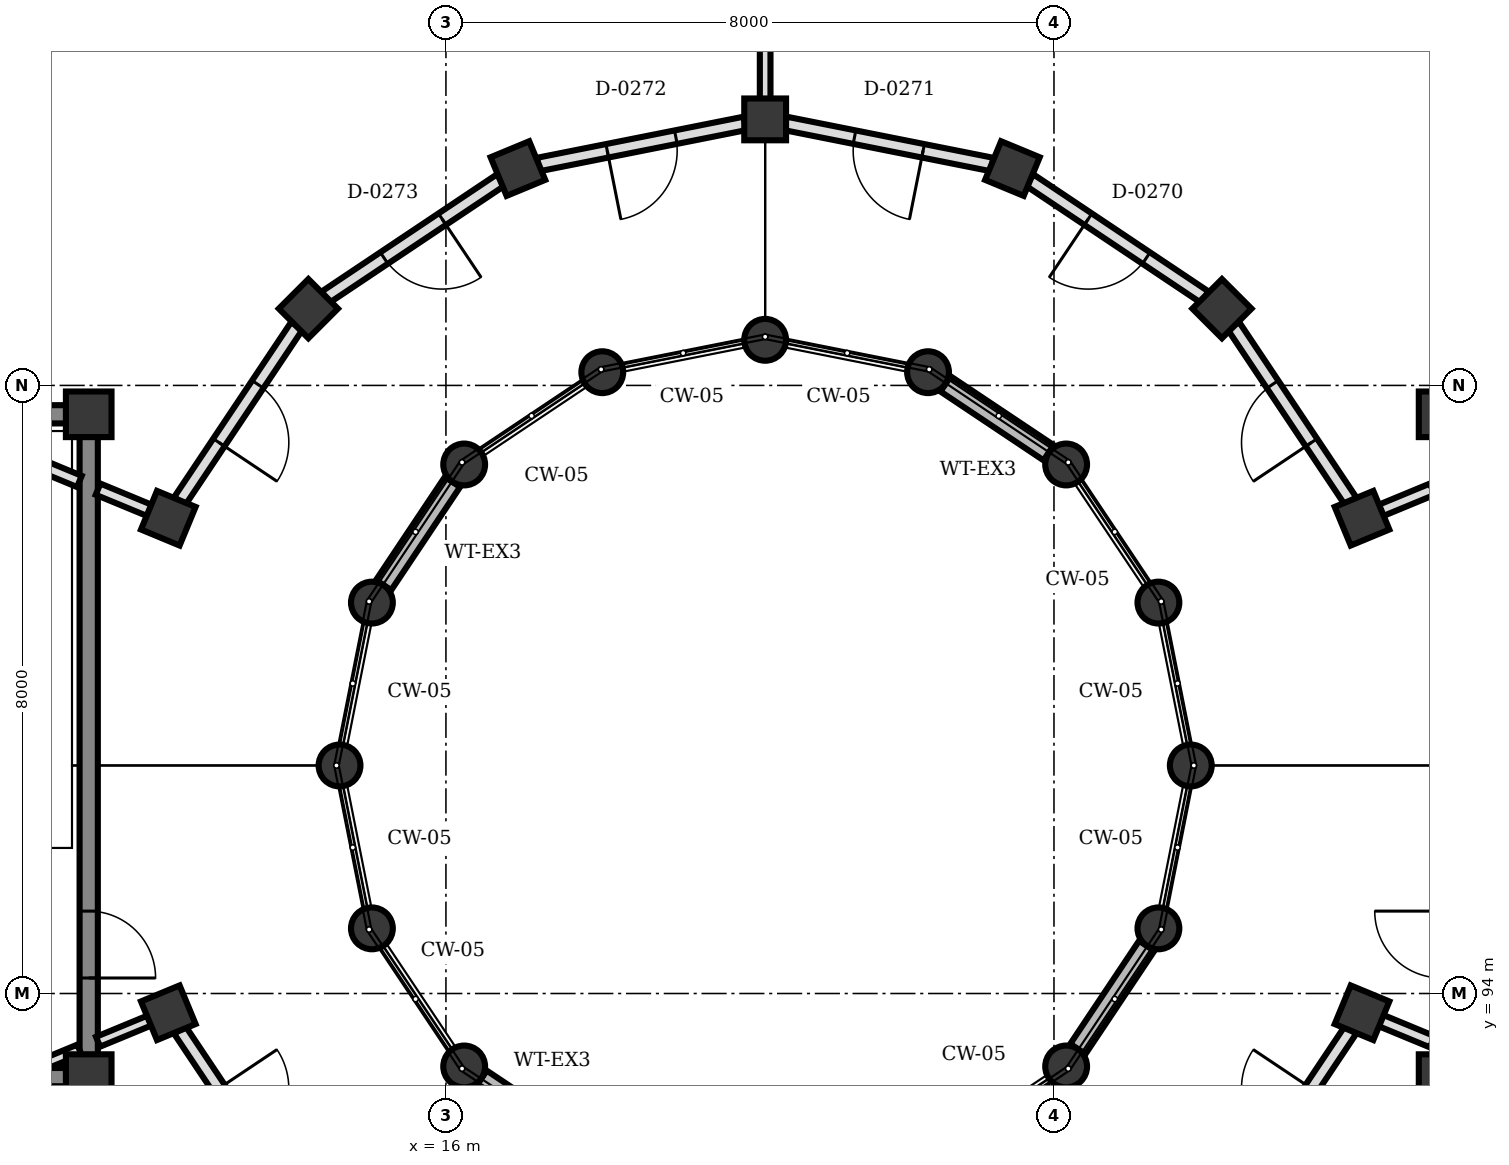
"""IFC4 building model, lengths in metres.
Left out: names, types, materials, properties, quantities, classifications, styles, units other than length and angle.
Written with IfcOpenShell. Run it as: python <this file> out.ifc"""

import sys

from ifc_helpers import new_model, si_unit, direction, frame, frame_2d, origin, origin_2d, place, context, subcontext, project, spatial, rectangle, circle, extrude, element, fill, save


model = new_model("IFC4")
c1 = context("Model", 3, precision=1e-05, world=origin(), true_north=direction((0.0, 1.0)))
c2 = subcontext(c1, "Body", "Model", "MODEL_VIEW")
j1 = project(units=[si_unit("LENGTHUNIT", "METRE"), si_unit("PLANEANGLEUNIT", "RADIAN")], contexts=[c1])
p1 = place(None, origin())
s1 = spatial("IfcSite", under=j1, at=p1, CompositionType="ELEMENT")
p2 = place(p1, origin())
s2 = spatial("IfcBuilding", under=s1, at=p2, CompositionType="ELEMENT")
p3 = place(p2, frame((0.0, 0.0, 12.5)))
s3 = spatial("IfcBuildingStorey", under=s2, at=p3, CompositionType="ELEMENT", Elevation=12.5)
for number, where, z_axis, x_axis in (
    (1, (11.3, 92.9, 0.0), (0.0, 0.0, 1.0), (1.0, 0.0, 0.0)),
    (2, (11.3, 101.62, 0.0), (0.0, 0.0, 1.0), (1.0, 0.0, 0.0)),
    (3, (29.1, 92.9, 0.0), (0.0, 0.0, 1.0), (1.0, 0.0, 0.0)),
    (4, (29.1, 101.62, 0.0), (0.0, 0.0, 1.0), (1.0, 0.0, 0.0)),
):
    element("IfcColumn", number, at=place(p3, frame(where, z_axis=z_axis, x_axis=x_axis)), inside=s3, PredefinedType="COLUMN", context=c2, shape_type="SweptSolid", body=[
        extrude(rectangle(XDim=0.6, YDim=0.6, at=origin_2d()), origin(), (0.0, 0.0, 1.0), 4.0),
    ])
for number, where, z_axis, x_axis in (
    (5, (25.8, 97.0, 0.0), (0.0, 0.0, 1.0), (1.0, 0.0, 0.0)),
    (6, (25.374, 99.143, 0.0), (0.0, 0.0, 1.0), (1.0, 0.0, 0.0)),
    (7, (24.16, 100.96, 0.0), (0.0, 0.0, 1.0), (1.0, 0.0, 0.0)),
    (8, (22.343, 102.174, 0.0), (0.0, 0.0, 1.0), (1.0, 0.0, 0.0)),
    (9, (20.2, 102.6, 0.0), (0.0, 0.0, 1.0), (1.0, 0.0, 0.0)),
    (10, (18.057, 102.174, 0.0), (0.0, 0.0, 1.0), (1.0, 0.0, 0.0)),
    (11, (16.24, 100.96, 0.0), (0.0, 0.0, 1.0), (1.0, 0.0, 0.0)),
    (12, (15.026, 99.143, 0.0), (0.0, 0.0, 1.0), (1.0, 0.0, 0.0)),
    (13, (14.6, 97.0, 0.0), (0.0, 0.0, 1.0), (1.0, 0.0, 0.0)),
    (14, (15.026, 94.857, 0.0), (0.0, 0.0, 1.0), (1.0, 0.0, 0.0)),
    (15, (16.24, 93.04, 0.0), (0.0, 0.0, 1.0), (1.0, 0.0, 0.0)),
    (16, (24.16, 93.04, 0.0), (0.0, 0.0, 1.0), (1.0, 0.0, 0.0)),
    (17, (25.374, 94.857, 0.0), (0.0, 0.0, 1.0), (1.0, 0.0, 0.0)),
):
    element("IfcColumn", number, at=place(p3, frame(where, z_axis=z_axis, x_axis=x_axis)), inside=s3, PredefinedType="COLUMN", context=c2, shape_type="SweptSolid", body=[
        extrude(circle(Radius=0.275, at=origin_2d()), origin(), (0.0, 0.0, 1.0), 3.765),
    ])
for number, where, z_axis, x_axis in (
    (18, (28.053, 100.253, 0.0), (0.0, 0.0, 1.0), (0.924, 0.383, 0.0)),
    (19, (26.21, 103.01, 0.0), (0.0, 0.0, 1.0), (0.707, 0.707, 0.0)),
    (20, (23.453, 104.853, 0.0), (0.0, 0.0, 1.0), (0.383, 0.924, 0.0)),
    (21, (20.2, 105.5, 0.0), (0.0, 0.0, 1.0), (0.0, 1.0, 0.0)),
    (22, (16.947, 104.853, 0.0), (0.0, 0.0, 1.0), (-0.383, 0.924, 0.0)),
    (23, (14.19, 103.01, 0.0), (0.0, 0.0, 1.0), (-0.707, 0.707, 0.0)),
    (24, (12.347, 100.253, 0.0), (0.0, 0.0, 1.0), (-0.924, 0.383, 0.0)),
    (25, (12.347, 93.747, 0.0), (0.0, 0.0, 1.0), (-0.924, -0.383, 0.0)),
    (26, (28.053, 93.747, 0.0), (0.0, 0.0, 1.0), (0.924, -0.383, 0.0)),
):
    element("IfcColumn", number, at=place(p3, frame(where, z_axis=z_axis, x_axis=x_axis)), inside=s3, PredefinedType="COLUMN", context=c2, shape_type="SweptSolid", body=[
        extrude(rectangle(XDim=0.55, YDim=0.55, at=origin_2d()), origin(), (0.0, 0.0, 1.0), 4.49),
    ])
for number, where, z_axis, x_axis in (
    (27, (23.93, 101.114, 0.0), (0.0, 0.0, 1.0), (-0.832, 0.555, 0.0)),
    (28, (16.086, 100.73, 0.0), (0.0, 0.0, 1.0), (-0.555, -0.832, 0.0)),
    (29, (16.47, 92.886, 0.0), (0.0, 0.0, 1.0), (0.832, -0.555, 0.0)),
    (30, (24.314, 93.27, 0.0), (0.0, 0.0, 1.0), (0.555, 0.832, 0.0)),
):
    element("IfcWall", number, at=place(p3, frame(where, z_axis=z_axis, x_axis=x_axis)), inside=s3, PredefinedType="SOLIDWALL", context=c2, shape_type="SweptSolid", body=[
        extrude(rectangle(XDim=1.632, YDim=0.24, at=frame_2d((0.816, 0.0))), origin(), (0.0, 0.0, 1.0), 3.275),
    ])
p4 = place(p3, frame((11.3, 101.328, 0.0), z_axis=(0.0, 0.0, 1.0), x_axis=(0.0, -1.0, 0.0)))
e31 = element("IfcWall", 31, at=p4, inside=s3, PredefinedType="SHEAR", context=c2, shape_type="SweptSolid", body=[
    extrude(rectangle(XDim=8.136, YDim=0.24, at=frame_2d((4.068, 0.0))), origin(), (0.0, 0.0, 1.0), 3.74),
])
p5 = place(p4, frame((6.244, 0.0, 0.0)))
e32 = element("IfcOpeningElement", 32, at=p5, cuts=e31, PredefinedType="OPENING", context=c2, shape_type="SweptSolid", body=[
    extrude(rectangle(XDim=0.88, YDim=2.1, at=frame_2d((0.44, 1.05))), frame((0.0, 0.13, 0.0), z_axis=(0.0, -1.0, 0.0), x_axis=(1.0, 0.0, 0.0)), (0.0, 0.0, 1.0), 0.26),
])
for number, where, z_axis, x_axis in (
    (33, (11.008, 92.9, 0.0), (0.0, 0.0, 1.0), (-1.0, 0.0, 0.0)),
    (34, (11.008, 101.62, 0.0), (0.0, 0.0, 1.0), (-1.0, 0.0, 0.0)),
):
    element("IfcWall", number, at=place(p3, frame(where, z_axis=z_axis, x_axis=x_axis)), inside=s3, PredefinedType="SHEAR", context=c2, shape_type="SweptSolid", body=[
        extrude(rectangle(XDim=4.216, YDim=0.24, at=frame_2d((2.108, 0.0))), origin(), (0.0, 0.0, 1.0), 3.74),
    ])
p6 = place(p3, frame((28.3, 100.355, 0.0), z_axis=(0.0, 0.0, 1.0), x_axis=(0.924069600435, 0.382224245113, 0.0)))
e35 = element("IfcWall", 35, at=p6, inside=s3, PredefinedType="PARTITIONING", context=c2, shape_type="SweptSolid", body=[
    extrude(rectangle(XDim=0.733, YDim=0.16, at=frame_2d((0.366, 0.0))), origin(), (0.0, 0.0, 1.0), 3.7),
])
p7 = place(p3, frame((20.2, 105.767, 0.0), z_axis=(0.0, 0.0, 1.0), x_axis=(0.0, 1.0, 0.0)))
e36 = element("IfcWall", 36, at=p7, inside=s3, PredefinedType="PARTITIONING", context=c2, shape_type="SweptSolid", body=[
    extrude(rectangle(XDim=8.441, YDim=0.14, at=frame_2d((4.22, 0.0))), origin(), (0.0, 0.0, 1.0), 3.7),
])
p8 = place(p3, frame((12.1, 100.355, 0.0), z_axis=(0.0, 0.0, 1.0), x_axis=(-0.924069600435, 0.382224245113, 0.0)))
e37 = element("IfcWall", 37, at=p8, inside=s3, PredefinedType="PARTITIONING", context=c2, shape_type="SweptSolid", body=[
    extrude(rectangle(XDim=0.733, YDim=0.16, at=frame_2d((0.366, 0.0))), origin(), (0.0, 0.0, 1.0), 3.7),
])
p9 = place(p3, frame((11.177, 100.737, 0.0), z_axis=(0.0, 0.0, 1.0), x_axis=(-0.923817443679, 0.382833293686, 0.0)))
e38 = element("IfcWall", 38, at=p9, inside=s3, PredefinedType="PARTITIONING", context=c2, shape_type="SweptSolid", body=[
    extrude(rectangle(XDim=1.985, YDim=0.16, at=frame_2d((0.993, 0.0))), origin(), (0.0, 0.0, 1.0), 3.7),
])
p10 = place(p3, frame((12.1, 93.645, 0.0), z_axis=(0.0, 0.0, 1.0), x_axis=(-0.924069600435, -0.382224245113, 0.0)))
e39 = element("IfcWall", 39, at=p10, inside=s3, PredefinedType="PARTITIONING", context=c2, shape_type="SweptSolid", body=[
    extrude(rectangle(XDim=0.733, YDim=0.14, at=frame_2d((0.366, 0.0))), origin(), (0.0, 0.0, 1.0), 3.7),
])
p11 = place(p3, frame((11.177, 93.263, 0.0), z_axis=(0.0, 0.0, 1.0), x_axis=(-0.923812676193, -0.382844797933, 0.0)))
e40 = element("IfcWall", 40, at=p11, inside=s3, PredefinedType="PARTITIONING", context=c2, shape_type="SweptSolid", body=[
    extrude(rectangle(XDim=0.627, YDim=0.14, at=frame_2d((0.313, 0.0))), origin(), (0.0, 0.0, 1.0), 3.7),
])
p12 = place(p3, frame((28.3, 93.645, 0.0), z_axis=(0.0, 0.0, 1.0), x_axis=(0.924069600435, -0.382224245113, 0.0)))
e41 = element("IfcWall", 41, at=p12, inside=s3, PredefinedType="PARTITIONING", context=c2, shape_type="SweptSolid", body=[
    extrude(rectangle(XDim=0.733, YDim=0.16, at=frame_2d((0.366, 0.0))), origin(), (0.0, 0.0, 1.0), 3.7),
])
p13 = place(p3, frame((27.902, 100.479, 0.0), z_axis=(0.0, 0.0, 1.0), x_axis=(-0.555797002478, 0.831318045056, 0.0)))
e42 = element("IfcWall", 42, at=p13, inside=s3, PredefinedType="PARTITIONING", context=c2, shape_type="SweptSolid", body=[
    extrude(rectangle(XDim=2.773, YDim=0.18, at=frame_2d((1.386, 0.0))), origin(), (0.0, 0.0, 1.0), 3.7),
])
p14 = place(p13, frame((0.926, 0.0, 0.0)))
e43 = element("IfcOpeningElement", 43, at=p14, cuts=e42, PredefinedType="OPENING", context=c2, shape_type="SweptSolid", body=[
    extrude(rectangle(XDim=0.92, YDim=2.1, at=frame_2d((0.46, 1.05))), frame((0.0, 0.1, 0.0), z_axis=(0.0, -1.0, 0.0), x_axis=(1.0, 0.0, 0.0)), (0.0, 0.0, 1.0), 0.2),
])
p15 = place(p3, frame((25.984, 103.161, 0.0), z_axis=(0.0, 0.0, 1.0), x_axis=(-0.831318045056, 0.555797002478, 0.0)))
e44 = element("IfcWall", 44, at=p15, inside=s3, PredefinedType="PARTITIONING", context=c2, shape_type="SweptSolid", body=[
    extrude(rectangle(XDim=2.773, YDim=0.18, at=frame_2d((1.386, 0.0))), origin(), (0.0, 0.0, 1.0), 3.7),
])
p16 = place(p15, frame((0.926, 0.0, 0.0)))
e45 = element("IfcOpeningElement", 45, at=p16, cuts=e44, PredefinedType="OPENING", context=c2, shape_type="SweptSolid", body=[
    extrude(rectangle(XDim=0.92, YDim=2.1, at=frame_2d((0.46, 1.05))), frame((0.0, 0.1, 0.0), z_axis=(0.0, -1.0, 0.0), x_axis=(1.0, 0.0, 0.0)), (0.0, 0.0, 1.0), 0.2),
])
p17 = place(p3, frame((23.186, 104.906, 0.0), z_axis=(0.0, 0.0, 1.0), x_axis=(-0.980773264811, 0.195150718759, 0.0)))
e46 = element("IfcWall", 46, at=p17, inside=s3, PredefinedType="PARTITIONING", context=c2, shape_type="SweptSolid", body=[
    extrude(rectangle(XDim=2.772, YDim=0.18, at=frame_2d((1.386, 0.0))), origin(), (0.0, 0.0, 1.0), 3.7),
])
p18 = place(p17, frame((0.926, 0.0, 0.0)))
e47 = element("IfcOpeningElement", 47, at=p18, cuts=e46, PredefinedType="OPENING", context=c2, shape_type="SweptSolid", body=[
    extrude(rectangle(XDim=0.92, YDim=2.1, at=frame_2d((0.46, 1.05))), frame((0.0, 0.1, 0.0), z_axis=(0.0, -1.0, 0.0), x_axis=(1.0, 0.0, 0.0)), (0.0, 0.0, 1.0), 0.2),
])
p19 = place(p3, frame((19.933, 105.447, 0.0), z_axis=(0.0, 0.0, 1.0), x_axis=(-0.980773264811, -0.195150718759, 0.0)))
e48 = element("IfcWall", 48, at=p19, inside=s3, PredefinedType="PARTITIONING", context=c2, shape_type="SweptSolid", body=[
    extrude(rectangle(XDim=2.772, YDim=0.18, at=frame_2d((1.386, 0.0))), origin(), (0.0, 0.0, 1.0), 3.7),
])
p20 = place(p19, frame((0.926, 0.0, 0.0)))
e49 = element("IfcOpeningElement", 49, at=p20, cuts=e48, PredefinedType="OPENING", context=c2, shape_type="SweptSolid", body=[
    extrude(rectangle(XDim=0.92, YDim=2.1, at=frame_2d((0.46, 1.05))), frame((0.0, 0.1, 0.0), z_axis=(0.0, -1.0, 0.0), x_axis=(1.0, 0.0, 0.0)), (0.0, 0.0, 1.0), 0.2),
])
p21 = place(p3, frame((16.721, 104.702, 0.0), z_axis=(0.0, 0.0, 1.0), x_axis=(-0.831318045056, -0.555797002478, 0.0)))
e50 = element("IfcWall", 50, at=p21, inside=s3, PredefinedType="PARTITIONING", context=c2, shape_type="SweptSolid", body=[
    extrude(rectangle(XDim=2.773, YDim=0.18, at=frame_2d((1.386, 0.0))), origin(), (0.0, 0.0, 1.0), 3.7),
])
p22 = place(p21, frame((0.926, 0.0, 0.0)))
e51 = element("IfcOpeningElement", 51, at=p22, cuts=e50, PredefinedType="OPENING", context=c2, shape_type="SweptSolid", body=[
    extrude(rectangle(XDim=0.92, YDim=2.1, at=frame_2d((0.46, 1.05))), frame((0.0, 0.1, 0.0), z_axis=(0.0, -1.0, 0.0), x_axis=(1.0, 0.0, 0.0)), (0.0, 0.0, 1.0), 0.2),
])
p23 = place(p3, frame((14.039, 102.784, 0.0), z_axis=(0.0, 0.0, 1.0), x_axis=(-0.555797002478, -0.831318045056, 0.0)))
e52 = element("IfcWall", 52, at=p23, inside=s3, PredefinedType="PARTITIONING", context=c2, shape_type="SweptSolid", body=[
    extrude(rectangle(XDim=2.773, YDim=0.18, at=frame_2d((1.386, 0.0))), origin(), (0.0, 0.0, 1.0), 3.7),
])
p24 = place(p23, frame((0.926, 0.0, 0.0)))
e53 = element("IfcOpeningElement", 53, at=p24, cuts=e52, PredefinedType="OPENING", context=c2, shape_type="SweptSolid", body=[
    extrude(rectangle(XDim=0.92, YDim=2.1, at=frame_2d((0.46, 1.05))), frame((0.0, 0.1, 0.0), z_axis=(0.0, -1.0, 0.0), x_axis=(1.0, 0.0, 0.0)), (0.0, 0.0, 1.0), 0.2),
])
p25 = place(p3, frame((12.498, 93.521, 0.0), z_axis=(0.0, 0.0, 1.0), x_axis=(0.555797002478, -0.831318045056, 0.0)))
e54 = element("IfcWall", 54, at=p25, inside=s3, PredefinedType="PARTITIONING", context=c2, shape_type="SweptSolid", body=[
    extrude(rectangle(XDim=2.773, YDim=0.18, at=frame_2d((1.386, 0.0))), origin(), (0.0, 0.0, 1.0), 3.7),
])
p26 = place(p25, frame((0.926, 0.0, 0.0)))
e55 = element("IfcOpeningElement", 55, at=p26, cuts=e54, PredefinedType="OPENING", context=c2, shape_type="SweptSolid", body=[
    extrude(rectangle(XDim=0.92, YDim=2.1, at=frame_2d((0.46, 1.05))), frame((0.0, 0.1, 0.0), z_axis=(0.0, -1.0, 0.0), x_axis=(1.0, 0.0, 0.0)), (0.0, 0.0, 1.0), 0.2),
])
p27 = place(p3, frame((26.361, 91.216, 0.0), z_axis=(0.0, 0.0, 1.0), x_axis=(0.555797002478, 0.831318045056, 0.0)))
e56 = element("IfcWall", 56, at=p27, inside=s3, PredefinedType="PARTITIONING", context=c2, shape_type="SweptSolid", body=[
    extrude(rectangle(XDim=2.773, YDim=0.18, at=frame_2d((1.386, 0.0))), origin(), (0.0, 0.0, 1.0), 3.7),
])
p28 = place(p27, frame((0.926, 0.0, 0.0)))
e57 = element("IfcOpeningElement", 57, at=p28, cuts=e56, PredefinedType="OPENING", context=c2, shape_type="SweptSolid", body=[
    extrude(rectangle(XDim=0.92, YDim=2.1, at=frame_2d((0.46, 1.05))), frame((0.0, 0.1, 0.0), z_axis=(0.0, -1.0, 0.0), x_axis=(1.0, 0.0, 0.0)), (0.0, 0.0, 1.0), 0.2),
])
p29 = place(p5, origin())
e58 = element("IfcDoor", 58, at=p29, inside=s3, OperationType="SINGLE_SWING_RIGHT", PredefinedType="DOOR", context=c2, shape_type="SweptSolid", body=[
    extrude(rectangle(XDim=0.88, YDim=2.1, at=frame_2d((0.44, 1.05))), frame((0.0, 0.025, 0.0), z_axis=(0.0, -1.0, 0.0), x_axis=(1.0, 0.0, 0.0)), (0.0, 0.0, 1.0), 0.05),
])
fill(e32, e58)
p30 = place(p14, origin())
e59 = element("IfcDoor", 59, at=p30, inside=s3, OperationType="SINGLE_SWING_LEFT", PredefinedType="DOOR", context=c2, shape_type="SweptSolid", body=[
    extrude(rectangle(XDim=0.92, YDim=2.1, at=frame_2d((0.46, 1.05))), frame((0.0, 0.025, 0.0), z_axis=(0.0, -1.0, 0.0), x_axis=(1.0, 0.0, 0.0)), (0.0, 0.0, 1.0), 0.05),
])
fill(e43, e59)
p31 = place(p16, origin())
e60 = element("IfcDoor", 60, at=p31, inside=s3, OperationType="SINGLE_SWING_RIGHT", PredefinedType="DOOR", context=c2, shape_type="SweptSolid", body=[
    extrude(rectangle(XDim=0.92, YDim=2.1, at=frame_2d((0.46, 1.05))), frame((0.0, 0.025, 0.0), z_axis=(0.0, -1.0, 0.0), x_axis=(1.0, 0.0, 0.0)), (0.0, 0.0, 1.0), 0.05),
])
fill(e45, e60)
p32 = place(p18, origin())
e61 = element("IfcDoor", 61, at=p32, inside=s3, OperationType="SINGLE_SWING_LEFT", PredefinedType="DOOR", context=c2, shape_type="SweptSolid", body=[
    extrude(rectangle(XDim=0.92, YDim=2.1, at=frame_2d((0.46, 1.05))), frame((0.0, 0.025, 0.0), z_axis=(0.0, -1.0, 0.0), x_axis=(1.0, 0.0, 0.0)), (0.0, 0.0, 1.0), 0.05),
])
fill(e47, e61)
p33 = place(p20, origin())
e62 = element("IfcDoor", 62, at=p33, inside=s3, OperationType="SINGLE_SWING_RIGHT", PredefinedType="DOOR", context=c2, shape_type="SweptSolid", body=[
    extrude(rectangle(XDim=0.92, YDim=2.1, at=frame_2d((0.46, 1.05))), frame((0.0, 0.025, 0.0), z_axis=(0.0, -1.0, 0.0), x_axis=(1.0, 0.0, 0.0)), (0.0, 0.0, 1.0), 0.05),
])
fill(e49, e62)
p34 = place(p22, origin())
e63 = element("IfcDoor", 63, at=p34, inside=s3, OperationType="SINGLE_SWING_LEFT", PredefinedType="DOOR", context=c2, shape_type="SweptSolid", body=[
    extrude(rectangle(XDim=0.92, YDim=2.1, at=frame_2d((0.46, 1.05))), frame((0.0, 0.025, 0.0), z_axis=(0.0, -1.0, 0.0), x_axis=(1.0, 0.0, 0.0)), (0.0, 0.0, 1.0), 0.05),
])
fill(e51, e63)
p35 = place(p24, origin())
e64 = element("IfcDoor", 64, at=p35, inside=s3, OperationType="SINGLE_SWING_RIGHT", PredefinedType="DOOR", context=c2, shape_type="SweptSolid", body=[
    extrude(rectangle(XDim=0.92, YDim=2.1, at=frame_2d((0.46, 1.05))), frame((0.0, 0.025, 0.0), z_axis=(0.0, -1.0, 0.0), x_axis=(1.0, 0.0, 0.0)), (0.0, 0.0, 1.0), 0.05),
])
fill(e53, e64)
save(model, sys.argv[1])
